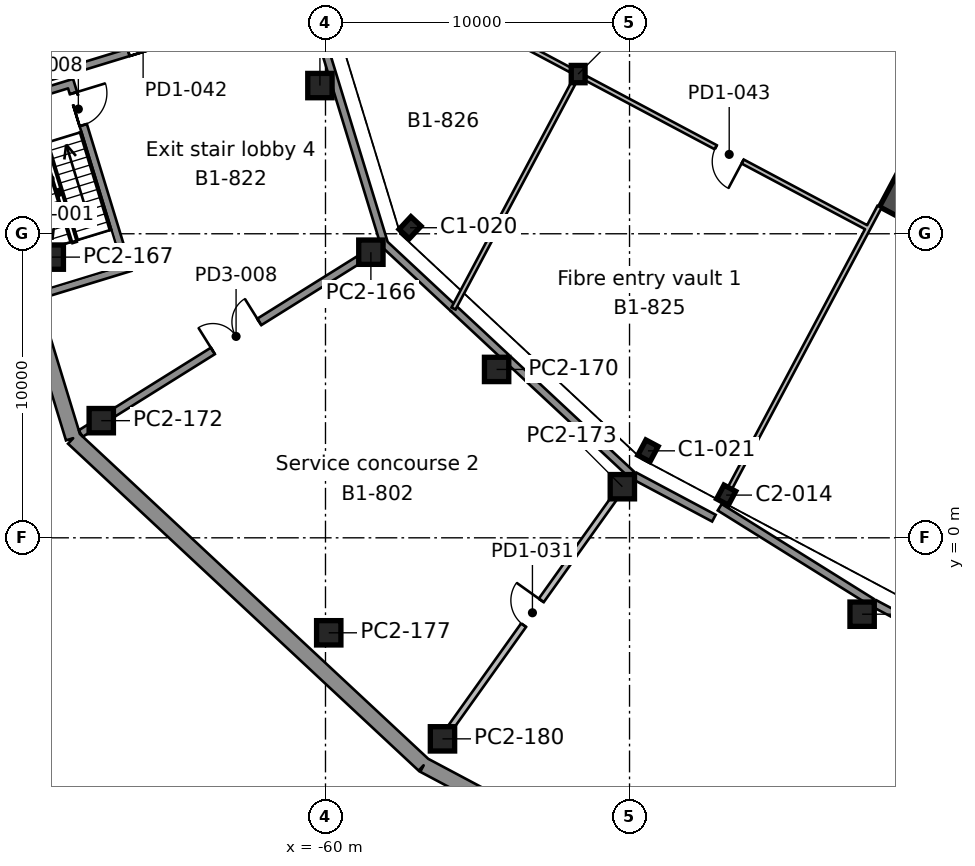
"""IFC4 building model, lengths in metres.
Left out: names, types, materials, properties, quantities, classifications, styles, units other than length and angle.
Written with IfcOpenShell. Run it as: python <this file> out.ifc"""

import sys

from ifc_helpers import new_model, si_unit, direction, frame, frame_2d, origin, origin_2d, place, context, subcontext, project, spatial, rectangle, i_section, extrude, element, fill, save


model = new_model("IFC4")
c1 = context("Model", 3, precision=1e-05, world=origin(), true_north=direction((0.0, 1.0)))
c2 = subcontext(c1, "Body", "Model", "MODEL_VIEW")
j1 = project(units=[si_unit("LENGTHUNIT", "METRE"), si_unit("PLANEANGLEUNIT", "RADIAN")], contexts=[c1])
p1 = place(None, origin())
s1 = spatial("IfcSite", under=j1, at=p1, CompositionType="ELEMENT")
p2 = place(p1, origin())
s2 = spatial("IfcBuilding", under=s1, at=p2, CompositionType="ELEMENT")
p3 = place(p2, frame((0.0, 0.0, -4.5)))
s3 = spatial("IfcBuildingStorey", under=s2, at=p3, CompositionType="ELEMENT", Elevation=-4.5)
p4 = place(p3, frame((-46.821, 1.405, 0.0), z_axis=(0.0, 0.0, 1.0), x_axis=(0.882947592859, -0.469471562786, 0.0)))
e1 = element("IfcColumn", 1, at=p4, inside=s3, PredefinedType="COLUMN", context=c2, shape_type="SweptSolid", body=[
    extrude(i_section(OverallWidth=0.437, OverallDepth=0.513, WebThickness=0.061, FlangeThickness=0.097, FilletRadius=0.015, at=origin_2d()), origin(), (0.0, 0.0, 1.0), 4.5),
])
for number, where, z_axis, x_axis in (
    (2, (-49.394, 2.861, 0.0), (0.0, 0.0, 1.0), (0.883, -0.469, 0.0)),
    (3, (-57.219, 10.199, 0.0), (0.0, 0.0, 1.0), (0.731, -0.682, 0.0)),
    (4, (-51.69, 15.252, 0.0), (0.0, 0.0, 1.0), (1.0, 0.0, 0.0)),
):
    element("IfcColumn", number, at=place(p3, frame(where, z_axis=z_axis, x_axis=x_axis)), inside=s3, PredefinedType="COLUMN", context=c2, shape_type="SweptSolid", body=[
        extrude(i_section(OverallWidth=0.455, OverallDepth=0.569, WebThickness=0.078, FlangeThickness=0.125, FilletRadius=0.015, at=origin_2d()), origin(), (0.0, 0.0, 1.0), 4.5),
    ])
p5 = place(p3, frame((-31.992, 28.336, 0.0), z_axis=(0.0, 0.0, 1.0), x_axis=(-0.46947084998, -0.882947971864, 0.0)))
e5 = element("IfcWall", 5, at=p5, inside=s3, PredefinedType="SHEAR", context=c2, shape_type="SweptSolid", body=[
    extrude(rectangle(XDim=20.0, YDim=0.9, at=frame_2d((10.0, 0.0))), origin(), (0.0, 0.0, 1.0), 4.5),
])
p6 = place(p5, frame((10.6, 0.0, 0.0)))
e6 = element("IfcOpeningElement", 6, at=p6, cuts=e5, PredefinedType="OPENING", context=c2, shape_type="SweptSolid", body=[
    extrude(rectangle(XDim=2.4, YDim=2.4, at=frame_2d((1.2, 1.2))), frame((0.0, 0.46, 0.0), z_axis=(0.0, -1.0, 0.0), x_axis=(1.0, 0.0, 0.0)), (0.0, 0.0, 1.0), 0.92),
])
p7 = place(p3, frame((-73.394, 19.951, 0.0), z_axis=(0.0, 0.0, 1.0), x_axis=(0.292377196349, -0.956303076987, 0.0)))
e7 = element("IfcWall", 7, at=p7, inside=s3, PredefinedType="SOLIDWALL", context=c2, shape_type="SweptSolid", body=[
    extrude(rectangle(XDim=17.435, YDim=0.5, at=frame_2d((8.718, 0.0))), origin(), (0.0, 0.0, 1.0), 4.5),
])
p8 = place(p3, frame((-68.297, 3.277, 0.0), z_axis=(0.0, 0.0, 1.0), x_axis=(0.73135285176, -0.681999271424, 0.0)))
e8 = element("IfcWall", 8, at=p8, inside=s3, PredefinedType="SOLIDWALL", context=c2, shape_type="SweptSolid", body=[
    extrude(rectangle(XDim=15.765, YDim=0.5, at=frame_2d((7.883, 0.0))), origin(), (0.0, 0.0, 1.0), 4.5),
])
p9 = place(p3, frame((-56.767, -7.475, 0.0), z_axis=(0.0, 0.0, 1.0), x_axis=(0.882947974138, -0.469470845703, 0.0)))
e9 = element("IfcWall", 9, at=p9, inside=s3, PredefinedType="SOLIDWALL", context=c2, shape_type="SweptSolid", body=[
    extrude(rectangle(XDim=57.833, YDim=0.5, at=frame_2d((28.917, 0.0))), origin(), (0.0, 0.0, 1.0), 4.5),
])
for number, where, z_axis, x_axis in (
    (10, (-56.152, -6.612, 0.0), (0.0, 0.0, 1.0), (1.0, 0.0, 0.0)),
    (11, (-59.893, -3.124, 0.0), (0.0, 0.0, 1.0), (1.0, 0.0, 0.0)),
    (12, (-42.35, -2.512, 0.0), (0.0, 0.0, 1.0), (1.0, 0.0, 0.0)),
    (13, (-50.236, 1.681, 0.0), (0.0, 0.0, 1.0), (1.0, 0.0, 0.0)),
    (14, (-67.375, 3.853, 0.0), (0.0, 0.0, 1.0), (1.0, 0.0, 0.0)),
    (15, (-54.372, 5.538, 0.0), (0.0, 0.0, 1.0), (1.0, 0.0, 0.0)),
    (16, (-69.019, 9.232, 0.0), (0.0, 0.0, 1.0), (1.0, 0.0, 0.0)),
    (17, (-58.507, 9.394, 0.0), (0.0, 0.0, 1.0), (1.0, 0.0, 0.0)),
    (18, (-60.183, 14.874, 0.0), (0.0, 0.0, 1.0), (1.0, 0.0, 0.0)),
):
    element("IfcColumn", number, at=place(p3, frame(where, z_axis=z_axis, x_axis=x_axis)), inside=s3, PredefinedType="COLUMN", context=c2, shape_type="SweptSolid", body=[
        extrude(rectangle(XDim=0.8, YDim=0.8, at=origin_2d()), origin(), (0.0, 0.0, 1.0), 4.05),
    ])
p10 = place(p3, frame((-71.449, 14.445, 0.0), z_axis=(0.0, 0.0, 1.0), x_axis=(0.956305341867, 0.292369788309, 0.0)))
e19 = element("IfcWall", 19, at=p10, inside=s3, PredefinedType="SOLIDWALL", context=c2, shape_type="SweptSolid", body=[
    extrude(rectangle(XDim=11.4, YDim=0.25, at=frame_2d((5.7, 0.0))), origin(), (0.0, 0.0, 1.0), 4.05),
])
p11 = place(p10, frame((5.2, 0.0, 0.0)))
e20 = element("IfcOpeningElement", 20, at=p11, cuts=e19, PredefinedType="OPENING", context=c2, shape_type="SweptSolid", body=[
    extrude(rectangle(XDim=1.0, YDim=2.1, at=frame_2d((0.5, 1.05))), frame((0.0, 0.135, 0.0), z_axis=(0.0, -1.0, 0.0), x_axis=(1.0, 0.0, 0.0)), (0.0, 0.0, 1.0), 0.27),
])
p12 = place(p3, frame((-58.065, 9.666, 0.0), z_axis=(0.0, 0.0, 1.0), x_axis=(-0.292613894095, 0.956230677704, 0.0)))
e21 = element("IfcWall", 21, at=p12, inside=s3, PredefinedType="SOLIDWALL", context=c2, shape_type="SweptSolid", body=[
    extrude(rectangle(XDim=8.487, YDim=0.25, at=frame_2d((4.244, 0.0))), origin(), (0.0, 0.0, 1.0), 4.05),
])
p13 = place(p3, frame((-68.052, 3.43, 0.0), z_axis=(0.0, 0.0, 1.0), x_axis=(0.847914279888, 0.530133354886, 0.0)))
e22 = element("IfcWall", 22, at=p13, inside=s3, PredefinedType="SOLIDWALL", context=c2, shape_type="SweptSolid", body=[
    extrude(rectangle(XDim=0.326, YDim=0.25, at=frame_2d((0.163, 0.0))), origin(), (0.0, 0.0, 1.0), 4.05),
])
p14 = place(p3, frame((-66.975, 4.103, 0.0), z_axis=(0.0, 0.0, 1.0), x_axis=(0.848048758951, 0.529918203539, 0.0)))
e23 = element("IfcWall", 23, at=p14, inside=s3, PredefinedType="SOLIDWALL", context=c2, shape_type="SweptSolid", body=[
    extrude(rectangle(XDim=9.514, YDim=0.25, at=frame_2d((4.757, 0.0))), origin(), (0.0, 0.0, 1.0), 4.05),
])
p15 = place(p14, frame((3.857, 0.0, 0.0)))
e24 = element("IfcOpeningElement", 24, at=p15, cuts=e23, PredefinedType="OPENING", context=c2, shape_type="SweptSolid", body=[
    extrude(rectangle(XDim=1.8, YDim=2.1, at=frame_2d((0.9, 1.05))), frame((0.0, 0.135, 0.0), z_axis=(0.0, -1.0, 0.0), x_axis=(1.0, 0.0, 0.0)), (0.0, 0.0, 1.0), 0.27),
])
p16 = place(p3, frame((-47.224, 0.646, 0.0), z_axis=(0.0, 0.0, 1.0), x_axis=(-0.882766080441, 0.469812778905, 0.0)))
e25 = element("IfcWall", 25, at=p16, inside=s3, PredefinedType="SOLIDWALL", context=c2, shape_type="SweptSolid", body=[
    extrude(rectangle(XDim=2.958, YDim=0.25, at=frame_2d((1.479, 0.0))), origin(), (0.0, 0.0, 1.0), 4.05),
])
p17 = place(p3, frame((-34.153, -6.304, 0.0), z_axis=(0.0, 0.0, 1.0), x_axis=(-0.882943838539, 0.469478623567, 0.0)))
e26 = element("IfcWall", 26, at=p17, inside=s3, PredefinedType="SOLIDWALL", context=c2, shape_type="SweptSolid", body=[
    extrude(rectangle(XDim=8.831, YDim=0.25, at=frame_2d((4.415, 0.0))), origin(), (0.0, 0.0, 1.0), 4.05),
])
p18 = place(p3, frame((-42.037, -2.112, 0.0), z_axis=(0.0, 0.0, 1.0), x_axis=(-0.848449825707, 0.529275819642, 0.0)))
e27 = element("IfcWall", 27, at=p18, inside=s3, PredefinedType="SOLIDWALL", context=c2, shape_type="SweptSolid", body=[
    extrude(rectangle(XDim=5.889, YDim=0.25, at=frame_2d((2.945, 0.0))), origin(), (0.0, 0.0, 1.0), 4.05),
])
p19 = place(p3, frame((-50.521, 1.281, 0.0), z_axis=(0.0, 0.0, 1.0), x_axis=(-0.580708624763, -0.814111474631, 0.0)))
e28 = element("IfcWall", 28, at=p19, inside=s3, PredefinedType="PARTITIONING", context=c2, shape_type="SweptSolid", body=[
    extrude(rectangle(XDim=9.204, YDim=0.2, at=frame_2d((4.602, 0.0))), origin(), (0.0, 0.0, 1.0), 4.05),
])
p20 = place(p19, frame((4.102, 0.0, 0.0)))
e29 = element("IfcOpeningElement", 29, at=p20, cuts=e28, PredefinedType="OPENING", context=c2, shape_type="SweptSolid", body=[
    extrude(rectangle(XDim=1.0, YDim=2.1, at=frame_2d((0.5, 1.05))), frame((0.0, 0.11, 0.0), z_axis=(0.0, -1.0, 0.0), x_axis=(1.0, 0.0, 0.0)), (0.0, 0.0, 1.0), 0.22),
])
p21 = place(p3, frame((-51.427, 15.113, 0.0), z_axis=(0.0, 0.0, 1.0), x_axis=(0.882942303397, -0.469481510681, 0.0)))
e30 = element("IfcWall", 30, at=p21, inside=s3, PredefinedType="PARTITIONING", context=c2, shape_type="SweptSolid", body=[
    extrude(rectangle(XDim=10.503, YDim=0.15, at=frame_2d((5.251, 0.0))), origin(), (0.0, 0.0, 1.0), 4.05),
])
p22 = place(p21, frame((4.83, 0.0, 0.0)))
e31 = element("IfcOpeningElement", 31, at=p22, cuts=e30, PredefinedType="OPENING", context=c2, shape_type="SweptSolid", body=[
    extrude(rectangle(XDim=1.0, YDim=2.1, at=frame_2d((0.5, 1.05))), frame((0.0, 0.085, 0.0), z_axis=(0.0, -1.0, 0.0), x_axis=(1.0, 0.0, 0.0)), (0.0, 0.0, 1.0), 0.17),
])
p23 = place(p3, frame((-60.632, 20.007, 0.0), z_axis=(0.0, 0.0, 1.0), x_axis=(0.882940733586, -0.469484462975, 0.0)))
e32 = element("IfcWall", 32, at=p23, inside=s3, PredefinedType="PARTITIONING", context=c2, shape_type="SweptSolid", body=[
    extrude(rectangle(XDim=9.83, YDim=0.15, at=frame_2d((4.915, 0.0))), origin(), (0.0, 0.0, 1.0), 4.05),
])
p24 = place(p23, frame((4.337, 0.0, 0.0)))
e33 = element("IfcOpeningElement", 33, at=p24, cuts=e32, PredefinedType="OPENING", context=c2, shape_type="SweptSolid", body=[
    extrude(rectangle(XDim=1.0, YDim=2.1, at=frame_2d((0.5, 1.05))), frame((0.0, 0.085, 0.0), z_axis=(0.0, -1.0, 0.0), x_axis=(1.0, 0.0, 0.0)), (0.0, 0.0, 1.0), 0.17),
])
p25 = place(p3, frame((-42.151, 10.187, 0.0), z_axis=(0.0, 0.0, 1.0), x_axis=(0.469582372655, 0.882888665287, 0.0)))
e34 = element("IfcWall", 34, at=p25, inside=s3, PredefinedType="PARTITIONING", context=c2, shape_type="SweptSolid", body=[
    extrude(rectangle(XDim=0.794, YDim=0.15, at=frame_2d((0.397, 0.0))), origin(), (0.0, 0.0, 1.0), 4.05),
])
p26 = place(p3, frame((-51.858, 14.936, 0.0), z_axis=(0.0, 0.0, 1.0), x_axis=(-0.469478534594, -0.882943885848, 0.0)))
e35 = element("IfcWall", 35, at=p26, inside=s3, PredefinedType="PARTITIONING", context=c2, shape_type="SweptSolid", body=[
    extrude(rectangle(XDim=8.373, YDim=0.15, at=frame_2d((4.187, 0.0))), origin(), (0.0, 0.0, 1.0), 4.05),
])
p27 = place(p3, frame((-46.7, 1.632, 0.0), z_axis=(0.0, 0.0, 1.0), x_axis=(0.46948131983, 0.882942404878, 0.0)))
e36 = element("IfcWall", 36, at=p27, inside=s3, PredefinedType="PARTITIONING", context=c2, shape_type="SweptSolid", body=[
    extrude(rectangle(XDim=9.688, YDim=0.15, at=frame_2d((4.844, 0.0))), origin(), (0.0, 0.0, 1.0), 4.05),
])
p28 = place(p3, frame((-55.785, 7.539, 0.0), z_axis=(0.0, 0.0, 1.0), x_axis=(0.731373339026, -0.681977300914, 0.0)))
e37 = element("IfcWall", 37, at=p28, inside=s3, PredefinedType="SOLIDWALL", context=c2, shape_type="SweptSolid", body=[
    extrude(rectangle(XDim=2.348, YDim=0.25, at=frame_2d((1.174, 0.0))), origin(), (0.0, 0.0, 1.0), 4.05),
])
p29 = place(p3, frame((-53.972, 5.849, 0.0), z_axis=(0.0, 0.0, 1.0), x_axis=(0.731317536597, -0.682037140239, 0.0)))
e38 = element("IfcWall", 38, at=p29, inside=s3, PredefinedType="SOLIDWALL", context=c2, shape_type="SweptSolid", body=[
    extrude(rectangle(XDim=5.509, YDim=0.25, at=frame_2d((2.754, 0.0))), origin(), (0.0, 0.0, 1.0), 4.05),
])
p30 = place(p3, frame((-58.068, 9.669, 0.0), z_axis=(0.0, 0.0, 1.0), x_axis=(0.731356961262, -0.681994864507, 0.0)))
e39 = element("IfcWall", 39, at=p30, inside=s3, PredefinedType="SOLIDWALL", context=c2, shape_type="SweptSolid", body=[
    extrude(rectangle(XDim=3.121, YDim=0.25, at=frame_2d((1.561, 0.0))), origin(), (0.0, 0.0, 1.0), 4.05),
])
for number, where, z_axis, x_axis in (
    (40, (-70.943, 14.155, 0.0), (0.0, 0.0, 1.0), (0.956, 0.292, 0.0)),
    (41, (-69.086, 8.083, 0.0), (0.0, 0.0, 1.0), (0.956, 0.292, 0.0)),
):
    element("IfcWall", number, at=place(p3, frame(where, z_axis=z_axis, x_axis=x_axis)), inside=s3, PredefinedType="SOLIDWALL", context=c2, shape_type="SweptSolid", body=[
        extrude(rectangle(XDim=2.8, YDim=0.25, at=frame_2d((1.4, 0.0))), origin(), (0.0, 0.0, 1.0), 4.05),
    ])
p31 = place(p3, frame((-68.421, 15.057, 0.0), z_axis=(0.0, 0.0, 1.0), x_axis=(0.292369833763, -0.956305327971, 0.0)))
e42 = element("IfcWall", 42, at=p31, inside=s3, PredefinedType="SOLIDWALL", context=c2, shape_type="SweptSolid", body=[
    extrude(rectangle(XDim=6.6, YDim=0.25, at=frame_2d((3.3, 0.0))), origin(), (0.0, 0.0, 1.0), 4.05),
])
p32 = place(p31, frame((0.45, 0.0, 0.0)))
e43 = element("IfcOpeningElement", 43, at=p32, cuts=e42, PredefinedType="OPENING", context=c2, shape_type="SweptSolid", body=[
    extrude(rectangle(XDim=1.1, YDim=2.1, at=frame_2d((0.55, 1.05))), frame((0.0, 0.135, 0.0), z_axis=(0.0, -1.0, 0.0), x_axis=(1.0, 0.0, 0.0)), (0.0, 0.0, 1.0), 0.27),
])
p33 = place(p32, origin())
e44 = element("IfcDoor", 44, at=p33, inside=s3, OperationType="SINGLE_SWING_LEFT", PredefinedType="DOOR", context=c2, shape_type="SweptSolid", body=[
    extrude(rectangle(XDim=1.1, YDim=2.1, at=frame_2d((0.55, 1.05))), frame((0.0, 0.025, 0.0), z_axis=(0.0, -1.0, 0.0), x_axis=(1.0, 0.0, 0.0)), (0.0, 0.0, 1.0), 0.05),
])
fill(e43, e44)
p34 = place(p22, frame((1.0, 0.0, 0.0), z_axis=(0.0, 0.0, 1.0), x_axis=(-1.0, 0.0, 0.0)))
e45 = element("IfcDoor", 45, at=p34, inside=s3, OperationType="SINGLE_SWING_LEFT", PredefinedType="DOOR", context=c2, shape_type="SweptSolid", body=[
    extrude(rectangle(XDim=1.0, YDim=2.1, at=frame_2d((0.5, 1.05))), frame((0.0, 0.025, 0.0), z_axis=(0.0, -1.0, 0.0), x_axis=(1.0, 0.0, 0.0)), (0.0, 0.0, 1.0), 0.05),
])
fill(e31, e45)
p35 = place(p15, origin())
e46 = element("IfcDoor", 46, at=p35, inside=s3, OperationType="DOUBLE_DOOR_SINGLE_SWING", PredefinedType="DOOR", context=c2, shape_type="SweptSolid", body=[
    extrude(rectangle(XDim=1.8, YDim=2.1, at=frame_2d((0.9, 1.05))), frame((0.0, 0.025, 0.0), z_axis=(0.0, -1.0, 0.0), x_axis=(1.0, 0.0, 0.0)), (0.0, 0.0, 1.0), 0.05),
])
fill(e24, e46)
p36 = place(p20, frame((1.0, 0.0, 0.0), z_axis=(0.0, 0.0, 1.0), x_axis=(-1.0, 0.0, 0.0)))
e47 = element("IfcDoor", 47, at=p36, inside=s3, OperationType="SINGLE_SWING_RIGHT", PredefinedType="DOOR", context=c2, shape_type="SweptSolid", body=[
    extrude(rectangle(XDim=1.0, YDim=2.1, at=frame_2d((0.5, 1.05))), frame((0.0, 0.025, 0.0), z_axis=(0.0, -1.0, 0.0), x_axis=(1.0, 0.0, 0.0)), (0.0, 0.0, 1.0), 0.05),
])
fill(e29, e47)
p37 = place(p11, origin())
e48 = element("IfcDoor", 48, at=p37, inside=s3, OperationType="SINGLE_SWING_RIGHT", PredefinedType="DOOR", context=c2, shape_type="SweptSolid", body=[
    extrude(rectangle(XDim=1.0, YDim=2.1, at=frame_2d((0.5, 1.05))), frame((0.0, 0.025, 0.0), z_axis=(0.0, -1.0, 0.0), x_axis=(1.0, 0.0, 0.0)), (0.0, 0.0, 1.0), 0.05),
])
fill(e20, e48)
save(model, sys.argv[1])
